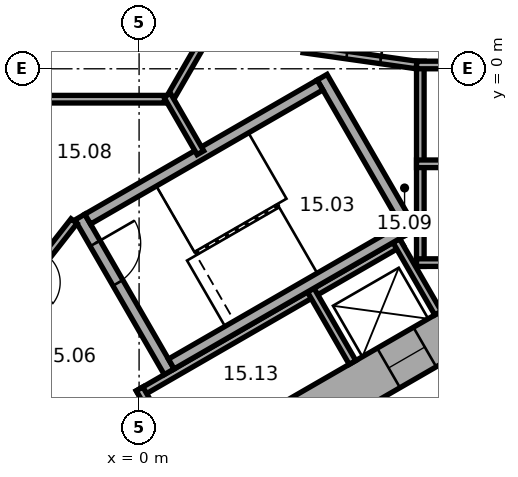
"""IFC4 building model, lengths in metres.
Left out: names, types, materials, properties, quantities, classifications, styles, units other than length and angle.
Written with IfcOpenShell. Run it as: python <this file> out.ifc"""

import sys

from ifc_helpers import new_model, si_unit, direction, frame, frame_2d, origin, place, context, subcontext, project, spatial, rectangle, extrude, element, fill, save


model = new_model("IFC4")
c1 = context("Model", 3, precision=1e-05, world=origin(), true_north=direction((0.0, 1.0)))
c2 = subcontext(c1, "Body", "Model", "MODEL_VIEW")
j1 = project(units=[si_unit("LENGTHUNIT", "METRE"), si_unit("PLANEANGLEUNIT", "RADIAN")], contexts=[c1])
p1 = place(None, origin())
s1 = spatial("IfcSite", under=j1, at=p1, CompositionType="ELEMENT")
p2 = place(p1, origin())
s2 = spatial("IfcBuilding", under=s1, at=p2, CompositionType="ELEMENT")
p3 = place(p2, frame((0.0, 0.0, 70.4)))
s3 = spatial("IfcBuildingStorey", under=s2, at=p3, CompositionType="ELEMENT", Elevation=70.4)
p4 = place(p3, frame((-10.4, -5.658, 0.0), z_axis=(0.0, 0.0, 1.0), x_axis=(0.866021384402, -0.500006961711, 0.0)))
e1 = element("IfcWall", 1, at=p4, inside=s3, PredefinedType="SHEAR", context=c2, shape_type="SweptSolid", body=[
    extrude(rectangle(XDim=12.355, YDim=1.2, at=frame_2d((6.178, 0.0))), origin(), (0.0, 0.0, 1.0), 3.3),
])
p5 = place(p4, frame((6.378, 0.0, 0.0)))
e2 = element("IfcOpeningElement", 2, at=p5, cuts=e1, PredefinedType="OPENING", context=c2, shape_type="SweptSolid", body=[
    extrude(rectangle(XDim=1.5, YDim=2.1, at=frame_2d((0.75, 1.05))), frame((0.0, 0.61, 0.0), z_axis=(0.0, -1.0, 0.0), x_axis=(1.0, 0.0, 0.0)), (0.0, 0.0, 1.0), 1.22),
])
p6 = place(p4, frame((3.228, 0.0, 0.0)))
e3 = element("IfcOpeningElement", 3, at=p6, cuts=e1, PredefinedType="OPENING", context=c2, shape_type="SweptSolid", body=[
    extrude(rectangle(XDim=0.9, YDim=2.1, at=frame_2d((0.45, 1.05))), frame((0.0, 0.61, 0.0), z_axis=(0.0, -1.0, 0.0), x_axis=(1.0, 0.0, 0.0)), (0.0, 0.0, 1.0), 1.22),
])
p7 = place(p3, frame((-0.3, -11.836, 0.0), z_axis=(0.0, 0.0, 1.0), x_axis=(0.866021384402, 0.500006961711, 0.0)))
e4 = element("IfcWall", 4, at=p7, inside=s3, PredefinedType="SHEAR", context=c2, shape_type="SweptSolid", body=[
    extrude(rectangle(XDim=12.355, YDim=1.2, at=frame_2d((6.178, 0.0))), origin(), (0.0, 0.0, 1.0), 3.3),
])
p8 = place(p7, frame((4.128, 0.0, 0.0)))
e5 = element("IfcOpeningElement", 5, at=p8, cuts=e4, PredefinedType="OPENING", context=c2, shape_type="SweptSolid", body=[
    extrude(rectangle(XDim=0.9, YDim=2.1, at=frame_2d((0.45, 1.05))), frame((0.0, 0.61, 0.0), z_axis=(0.0, -1.0, 0.0), x_axis=(1.0, 0.0, 0.0)), (0.0, 0.0, 1.0), 1.22),
])
p9 = place(p7, frame((7.928, 0.0, 0.0)))
e6 = element("IfcOpeningElement", 6, at=p9, cuts=e4, PredefinedType="OPENING", context=c2, shape_type="SweptSolid", body=[
    extrude(rectangle(XDim=1.1, YDim=2.1, at=frame_2d((0.55, 1.05))), frame((0.0, 0.61, 0.0), z_axis=(0.0, -1.0, 0.0), x_axis=(1.0, 0.0, 0.0)), (0.0, 0.0, 1.0), 1.22),
])
p10 = place(p3, frame((7.4, -5.2, 0.0), z_axis=(0.0, 0.0, 1.0), x_axis=(0.0, 1.0, 0.0)))
e7 = element("IfcWall", 7, at=p10, inside=s3, PredefinedType="PARTITIONING", context=c2, shape_type="SweptSolid", body=[
    extrude(rectangle(XDim=5.4, YDim=0.2, at=frame_2d((2.7, 0.0))), origin(), (0.0, 0.0, 1.0), 3.05),
])
for number, where, z_axis, x_axis in (
    (8, (7.3, -5.1, 0.0), (0.0, 0.0, 1.0), (1.0, 0.0, 0.0)),
    (9, (7.3, -2.5, 0.0), (0.0, 0.0, 1.0), (1.0, 0.0, 0.0)),
    (10, (7.3, 0.1, 0.0), (0.0, 0.0, 1.0), (1.0, 0.0, 0.0)),
):
    element("IfcWall", number, at=place(p3, frame(where, z_axis=z_axis, x_axis=x_axis)), inside=s3, PredefinedType="PARTITIONING", context=c2, shape_type="SweptSolid", body=[
        extrude(rectangle(XDim=2.2, YDim=0.2, at=frame_2d((1.1, 0.0))), origin(), (0.0, 0.0, 1.0), 3.05),
    ])
p11 = place(p3, frame((-0.024, -8.559, 0.0), z_axis=(0.0, 0.0, 1.0), x_axis=(0.866026010844, 0.49999894854, 0.0)))
e11 = element("IfcWall", 11, at=p11, inside=s3, PredefinedType="PARTITIONING", context=c2, shape_type="SweptSolid", body=[
    extrude(rectangle(XDim=8.0, YDim=0.2, at=frame_2d((4.0, 0.0))), origin(), (0.0, 0.0, 1.0), 3.05),
])
for number, where, z_axis, x_axis in (
    (12, (0.013, -8.422, 0.0), (0.0, 0.0, 1.0), (0.5, -0.866, 0.0)),
    (13, (4.516, -5.822, 0.0), (0.0, 0.0, 1.0), (0.5, -0.866, 0.0)),
    (14, (6.768, -4.522, 0.0), (0.0, 0.0, 1.0), (0.5, -0.866, 0.0)),
):
    element("IfcWall", number, at=place(p3, frame(where, z_axis=z_axis, x_axis=x_axis)), inside=s3, PredefinedType="PARTITIONING", context=c2, shape_type="SweptSolid", body=[
        extrude(rectangle(XDim=2.2, YDim=0.2, at=frame_2d((1.1, 0.0))), origin(), (0.0, 0.0, 1.0), 3.05),
    ])
p12 = place(p3, frame((-1.558, -3.902, 0.0), z_axis=(0.0, 0.0, 1.0), x_axis=(0.499977259774, -0.866038532462, 0.0)))
e15 = element("IfcWall", 15, at=p12, inside=s3, PredefinedType="SHEAR", context=c2, shape_type="SweptSolid", body=[
    extrude(rectangle(XDim=4.7, YDim=0.3, at=frame_2d((2.35, 0.0))), origin(), (0.0, 0.0, 1.0), 3.05),
])
p13 = place(p12, frame((0.8, 0.0, 0.0)))
e16 = element("IfcOpeningElement", 16, at=p13, cuts=e15, PredefinedType="OPENING", context=c2, shape_type="SweptSolid", body=[
    extrude(rectangle(XDim=1.2, YDim=2.1, at=frame_2d((0.6, 1.05))), frame((0.0, 0.16, 0.0), z_axis=(0.0, -1.0, 0.0), x_axis=(1.0, 0.0, 0.0)), (0.0, 0.0, 1.0), 0.32),
])
p14 = place(p3, frame((4.816, -0.222, 0.0), z_axis=(0.0, 0.0, 1.0), x_axis=(0.499977259774, -0.866038532462, 0.0)))
e17 = element("IfcWall", 17, at=p14, inside=s3, PredefinedType="SHEAR", context=c2, shape_type="SweptSolid", body=[
    extrude(rectangle(XDim=4.7, YDim=0.3, at=frame_2d((2.35, 0.0))), origin(), (0.0, 0.0, 1.0), 3.05),
])
for number, where, z_axis, x_axis in (
    (18, (-1.353, -3.957, 0.0), (0.0, 0.0, 1.0), (0.866, 0.5, 0.0)),
    (19, (0.847, -7.767, 0.0), (0.0, 0.0, 1.0), (0.866, 0.5, 0.0)),
):
    element("IfcWall", number, at=place(p3, frame(where, z_axis=z_axis, x_axis=x_axis)), inside=s3, PredefinedType="SHEAR", context=c2, shape_type="SweptSolid", body=[
        extrude(rectangle(XDim=7.06, YDim=0.3, at=frame_2d((3.53, 0.0))), origin(), (0.0, 0.0, 1.0), 3.05),
    ])
p15 = place(p3, frame((4.327, 0.521, 0.0), z_axis=(0.0, 0.0, 1.0), x_axis=(0.990124376366, -0.14019172346, 0.0)))
e20 = element("IfcWall", 20, at=p15, inside=s3, PredefinedType="PARTITIONING", context=c2, shape_type="SweptSolid", body=[
    extrude(rectangle(XDim=3.002, YDim=0.2, at=frame_2d((1.501, 0.0))), origin(), (0.0, 0.0, 1.0), 3.05),
])
p16 = place(p15, frame((1.15, 0.0, 0.0)))
e21 = element("IfcOpeningElement", 21, at=p16, cuts=e20, PredefinedType="OPENING", context=c2, shape_type="SweptSolid", body=[
    extrude(rectangle(XDim=0.9, YDim=2.1, at=frame_2d((0.45, 1.05))), frame((0.0, 0.11, 0.0), z_axis=(0.0, -1.0, 0.0), x_axis=(1.0, 0.0, 0.0)), (0.0, 0.0, 1.0), 0.22),
])
p17 = place(p3, frame((-1.712, -4.008, 0.0), z_axis=(0.0, 0.0, 1.0), x_axis=(-0.616549420702, -0.787316208287, 0.0)))
e22 = element("IfcWall", 22, at=p17, inside=s3, PredefinedType="PARTITIONING", context=c2, shape_type="SweptSolid", body=[
    extrude(rectangle(XDim=3.002, YDim=0.2, at=frame_2d((1.501, 0.0))), origin(), (0.0, 0.0, 1.0), 3.05),
])
p18 = place(p17, frame((1.15, 0.0, 0.0)))
e23 = element("IfcOpeningElement", 23, at=p18, cuts=e22, PredefinedType="OPENING", context=c2, shape_type="SweptSolid", body=[
    extrude(rectangle(XDim=0.9, YDim=2.1, at=frame_2d((0.45, 1.05))), frame((0.0, 0.11, 0.0), z_axis=(0.0, -1.0, 0.0), x_axis=(1.0, 0.0, 0.0)), (0.0, 0.0, 1.0), 0.22),
])
p19 = place(p3, frame((0.92, -0.8, 0.0), z_axis=(0.0, 0.0, 1.0), x_axis=(-1.0, 0.0, 0.0)))
e24 = element("IfcWall", 24, at=p19, inside=s3, PredefinedType="PARTITIONING", context=c2, shape_type="SweptSolid", body=[
    extrude(rectangle(XDim=3.64, YDim=0.2, at=frame_2d((1.82, 0.0))), origin(), (0.0, 0.0, 1.0), 3.05),
])
p20 = place(p3, frame((0.74, -0.904, 0.0), z_axis=(0.0, 0.0, 1.0), x_axis=(0.500028278809, 0.866009076391, 0.0)))
e25 = element("IfcWall", 25, at=p20, inside=s3, PredefinedType="PARTITIONING", context=c2, shape_type="SweptSolid", body=[
    extrude(rectangle(XDim=3.133, YDim=0.2, at=frame_2d((1.566, 0.0))), origin(), (0.0, 0.0, 1.0), 3.05),
])
p21 = place(p3, frame((0.74, -0.696, 0.0), z_axis=(0.0, 0.0, 1.0), x_axis=(0.499956301907, -0.86605063142, 0.0)))
e26 = element("IfcWall", 26, at=p21, inside=s3, PredefinedType="PARTITIONING", context=c2, shape_type="SweptSolid", body=[
    extrude(rectangle(XDim=1.747, YDim=0.2, at=frame_2d((0.874, 0.0))), origin(), (0.0, 0.0, 1.0), 3.05),
])
p22 = place(p3, frame((-11.615, -7.843, 0.0), z_axis=(0.0, 0.0, 1.0), x_axis=(0.866026466995, -0.499998158461, 0.0)))
e27 = element("IfcWall", 27, at=p22, inside=s3, PredefinedType="PARTITIONING", context=c2, shape_type="SweptSolid", body=[
    extrude(rectangle(XDim=12.315, YDim=0.2, at=frame_2d((6.158, 0.0))), origin(), (0.0, 0.0, 1.0), 3.05),
])
p23 = place(p22, frame((5.983, 0.0, 0.0)))
e28 = element("IfcOpeningElement", 28, at=p23, cuts=e27, PredefinedType="OPENING", context=c2, shape_type="SweptSolid", body=[
    extrude(rectangle(XDim=0.9, YDim=2.1, at=frame_2d((0.45, 1.05))), frame((0.0, 0.11, 0.0), z_axis=(0.0, -1.0, 0.0), x_axis=(1.0, 0.0, 0.0)), (0.0, 0.0, 1.0), 0.22),
])
p24 = place(p22, frame((10.229, 0.0, 0.0)))
e29 = element("IfcOpeningElement", 29, at=p24, cuts=e27, PredefinedType="OPENING", context=c2, shape_type="SweptSolid", body=[
    extrude(rectangle(XDim=0.9, YDim=2.1, at=frame_2d((0.45, 1.05))), frame((0.0, 0.11, 0.0), z_axis=(0.0, -1.0, 0.0), x_axis=(1.0, 0.0, 0.0)), (0.0, 0.0, 1.0), 0.22),
])
p25 = place(p13, origin())
e30 = element("IfcDoor", 30, at=p25, inside=s3, OperationType="SINGLE_SWING_RIGHT", PredefinedType="DOOR", context=c2, shape_type="SweptSolid", body=[
    extrude(rectangle(XDim=1.2, YDim=2.1, at=frame_2d((0.6, 1.05))), frame((0.0, 0.025, 0.0), z_axis=(0.0, -1.0, 0.0), x_axis=(1.0, 0.0, 0.0)), (0.0, 0.0, 1.0), 0.05),
])
fill(e16, e30)
p26 = place(p16, origin())
e31 = element("IfcDoor", 31, at=p26, inside=s3, OperationType="SINGLE_SWING_LEFT", PredefinedType="DOOR", context=c2, shape_type="SweptSolid", body=[
    extrude(rectangle(XDim=0.9, YDim=2.1, at=frame_2d((0.45, 1.05))), frame((0.0, 0.025, 0.0), z_axis=(0.0, -1.0, 0.0), x_axis=(1.0, 0.0, 0.0)), (0.0, 0.0, 1.0), 0.05),
])
fill(e21, e31)
p27 = place(p9, origin())
e32 = element("IfcDoor", 32, at=p27, inside=s3, OperationType="DOUBLE_DOOR_SLIDING", PredefinedType="DOOR", context=c2, shape_type="SweptSolid", body=[
    extrude(rectangle(XDim=1.1, YDim=2.1, at=frame_2d((0.55, 1.05))), frame((0.0, 0.025, 0.0), z_axis=(0.0, -1.0, 0.0), x_axis=(1.0, 0.0, 0.0)), (0.0, 0.0, 1.0), 0.05),
])
fill(e6, e32)
save(model, sys.argv[1])
